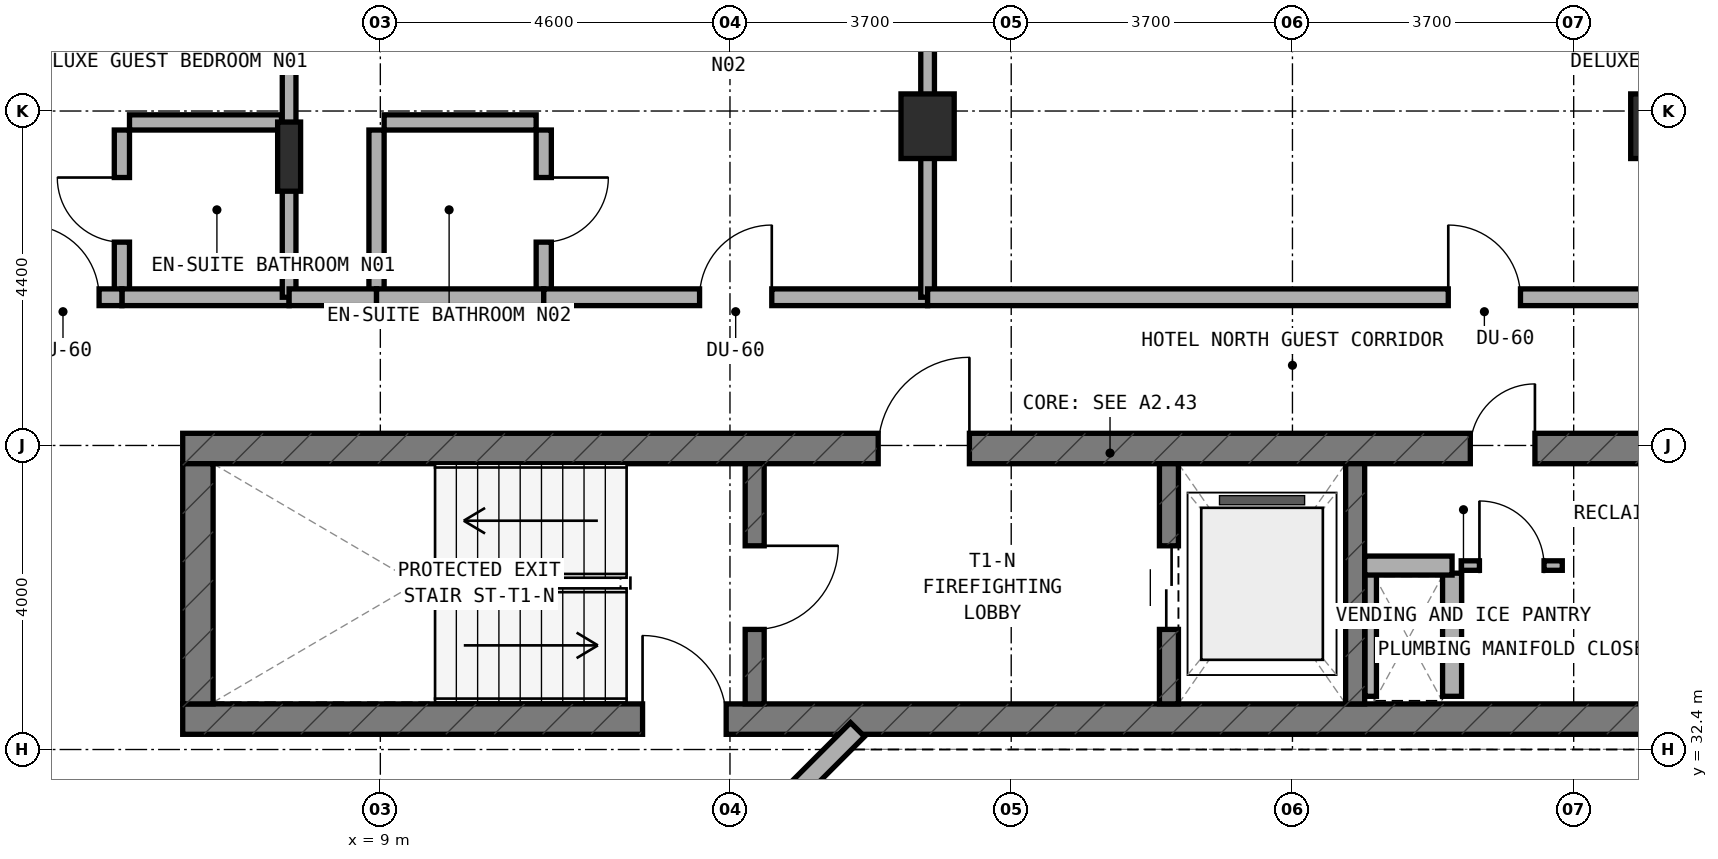
"""IFC4 building model, lengths in metres.
Left out: names, types, materials, properties, quantities, classifications, styles, units other than length and angle.
Written with IfcOpenShell. Run it as: python <this file> out.ifc"""

import sys

from ifc_helpers import new_model, si_unit, direction, frame, frame_2d, origin, origin_2d, place, context, subcontext, project, spatial, rectangle, i_section, extrude, element, fill, save


model = new_model("IFC4")
c1 = context("Model", 3, precision=1e-05, world=origin(), true_north=direction((0.0, 1.0)))
c2 = subcontext(c1, "Body", "Model", "MODEL_VIEW")
j1 = project(units=[si_unit("LENGTHUNIT", "METRE"), si_unit("PLANEANGLEUNIT", "RADIAN")], contexts=[c1])
p1 = place(None, origin())
s1 = spatial("IfcSite", under=j1, at=p1, CompositionType="ELEMENT")
p2 = place(p1, origin())
s2 = spatial("IfcBuilding", under=s1, at=p2, CompositionType="ELEMENT")
p3 = place(p2, frame((0.0, 0.0, 199.1)))
s3 = spatial("IfcBuildingStorey", under=s2, at=p3, CompositionType="ELEMENT", Elevation=199.1)
p4 = place(p3, frame((6.4, 32.8, 0.0), z_axis=(0.0, 0.0, 1.0), x_axis=(1.0, 0.0, 0.0)))
e1 = element("IfcWall", 1, at=p4, inside=s3, PredefinedType="SHEAR", context=c2, shape_type="SweptSolid", body=[
    extrude(rectangle(XDim=24.4, YDim=0.4, at=frame_2d((12.2, 0.0))), origin(), (0.0, 0.0, 1.0), 3.6),
])
p5 = place(p4, frame((6.05, 0.0, 0.0)))
e2 = element("IfcOpeningElement", 2, at=p5, cuts=e1, PredefinedType="OPENING", context=c2, shape_type="SweptSolid", body=[
    extrude(rectangle(XDim=1.1, YDim=2.15, at=frame_2d((0.55, 1.075))), frame((0.0, 0.21, 0.0), z_axis=(0.0, -1.0, 0.0), x_axis=(1.0, 0.0, 0.0)), (0.0, 0.0, 1.0), 0.42),
])
p6 = place(p3, frame((6.4, 36.36, 0.0), z_axis=(0.0, 0.0, 1.0), x_axis=(1.0, 0.0, 0.0)))
e3 = element("IfcWall", 3, at=p6, inside=s3, PredefinedType="SHEAR", context=c2, shape_type="SweptSolid", body=[
    extrude(rectangle(XDim=24.4, YDim=0.4, at=frame_2d((12.2, 0.0))), origin(), (0.0, 0.0, 1.0), 3.6),
])
p7 = place(p6, frame((9.15, 0.0, 0.0)))
e4 = element("IfcOpeningElement", 4, at=p7, cuts=e3, PredefinedType="OPENING", context=c2, shape_type="SweptSolid", body=[
    extrude(rectangle(XDim=1.2, YDim=2.15, at=frame_2d((0.6, 1.075))), frame((0.0, 0.21, 0.0), z_axis=(0.0, -1.0, 0.0), x_axis=(1.0, 0.0, 0.0)), (0.0, 0.0, 1.0), 0.42),
])
p8 = place(p6, frame((19.2, 0.0, 0.0)))
e5 = element("IfcOpeningElement", 5, at=p8, cuts=e3, PredefinedType="OPENING", context=c2, shape_type="SweptSolid", body=[
    extrude(rectangle(XDim=0.85, YDim=2.1, at=frame_2d((0.425, 1.05))), frame((0.0, 0.21, 0.0), z_axis=(0.0, -1.0, 0.0), x_axis=(1.0, 0.0, 0.0)), (0.0, 0.0, 1.0), 0.42),
])
p9 = place(p6, frame((16.94, 0.0, 0.0)))
e6 = element("IfcOpeningElement", 6, at=p9, cuts=e3, PredefinedType="OPENING", context=c2, shape_type="SweptSolid", body=[
    extrude(rectangle(XDim=0.85, YDim=2.1, at=frame_2d((0.425, 1.05))), frame((0.0, 0.21, 0.0), z_axis=(0.0, -1.0, 0.0), x_axis=(1.0, 0.0, 0.0)), (0.0, 0.0, 1.0), 0.42),
])
p10 = place(p3, frame((6.6, 33.0, 0.0), z_axis=(0.0, 0.0, 1.0), x_axis=(0.0, 1.0, 0.0)))
e7 = element("IfcWall", 7, at=p10, inside=s3, PredefinedType="SHEAR", context=c2, shape_type="SweptSolid", body=[
    extrude(rectangle(XDim=3.16, YDim=0.4, at=frame_2d((1.58, 0.0))), origin(), (0.0, 0.0, 1.0), 3.6),
])
p11 = place(p3, frame((13.925, 33.0, 0.0), z_axis=(0.0, 0.0, 1.0), x_axis=(0.0, 1.0, 0.0)))
e8 = element("IfcWall", 8, at=p11, inside=s3, PredefinedType="STANDARD", context=c2, shape_type="SweptSolid", body=[
    extrude(rectangle(XDim=3.16, YDim=0.25, at=frame_2d((1.58, 0.0))), origin(), (0.0, 0.0, 1.0), 3.32),
])
p12 = place(p11, frame((0.98, 0.0, 0.0)))
e9 = element("IfcOpeningElement", 9, at=p12, cuts=e8, PredefinedType="OPENING", context=c2, shape_type="SweptSolid", body=[
    extrude(rectangle(XDim=1.1, YDim=2.15, at=frame_2d((0.55, 1.075))), frame((0.0, 0.135, 0.0), z_axis=(0.0, -1.0, 0.0), x_axis=(1.0, 0.0, 0.0)), (0.0, 0.0, 1.0), 0.27),
])
p13 = place(p3, frame((19.375, 33.0, 0.0), z_axis=(0.0, 0.0, 1.0), x_axis=(0.0, 1.0, 0.0)))
e10 = element("IfcWall", 10, at=p13, inside=s3, PredefinedType="STANDARD", context=c2, shape_type="SweptSolid", body=[
    extrude(rectangle(XDim=3.16, YDim=0.25, at=frame_2d((1.58, 0.0))), origin(), (0.0, 0.0, 1.0), 3.32),
])
p14 = place(p13, frame((0.98, 0.0, 0.0)))
e11 = element("IfcOpeningElement", 11, at=p14, cuts=e10, PredefinedType="OPENING", context=c2, shape_type="SweptSolid", body=[
    extrude(rectangle(XDim=1.1, YDim=2.15, at=frame_2d((0.55, 1.075))), frame((0.0, 0.135, 0.0), z_axis=(0.0, -1.0, 0.0), x_axis=(1.0, 0.0, 0.0)), (0.0, 0.0, 1.0), 0.27),
])
p15 = place(p3, frame((21.825, 33.0, 0.0), z_axis=(0.0, 0.0, 1.0), x_axis=(0.0, 1.0, 0.0)))
e12 = element("IfcWall", 12, at=p15, inside=s3, PredefinedType="STANDARD", context=c2, shape_type="SweptSolid", body=[
    extrude(rectangle(XDim=3.16, YDim=0.25, at=frame_2d((1.58, 0.0))), origin(), (0.0, 0.0, 1.0), 3.32),
])
for number, where, z_axis, x_axis in (
    (13, (16.2, 40.6, 0.0), (0.0, 0.0, 1.0), (1.0, 0.0, 0.0)),
    (14, (25.8, 40.6, 0.0), (0.0, 0.0, 1.0), (1.0, 0.0, 0.0)),
):
    element("IfcColumn", number, at=place(p3, frame(where, z_axis=z_axis, x_axis=x_axis)), inside=s3, PredefinedType="COLUMN", context=c2, shape_type="SweptSolid", body=[
        extrude(rectangle(XDim=0.7, YDim=0.85, at=origin_2d()), origin(), (0.0, 0.0, 1.0), 3.6),
    ])
p16 = place(p3, frame((7.8, 40.2, 0.0), z_axis=(0.0, 0.0, 1.0), x_axis=(1.0, 0.0, 0.0)))
e15 = element("IfcColumn", 15, at=p16, inside=s3, PredefinedType="COLUMN", context=c2, shape_type="SweptSolid", body=[
    extrude(i_section(OverallWidth=0.302, OverallDepth=0.91, WebThickness=0.021, FlangeThickness=0.04, FilletRadius=0.03, at=origin_2d()), origin(), (0.0, 0.0, 1.0), 3.6),
])
p17 = place(p3, frame((5.199, 41.983, 0.0), z_axis=(0.0, 0.0, 1.0), x_axis=(-0.793999057278, -0.607918988881, 0.0)))
e16 = element("IfcWall", 16, at=p17, inside=s3, PredefinedType="STANDARD", context=c2, shape_type="SweptSolid", body=[
    extrude(rectangle(XDim=0.85, YDim=0.26, at=frame_2d((0.425, 0.0))), origin(), (0.0, 0.0, 1.0), 3.32),
])
p18 = place(p3, frame((15.278, 32.662, 0.0), z_axis=(0.0, 0.0, 1.0), x_axis=(-0.707059717605, -0.707153841636, 0.0)))
e17 = element("IfcWall", 17, at=p18, inside=s3, PredefinedType="STANDARD", context=c2, shape_type="SweptSolid", body=[
    extrude(rectangle(XDim=2.594, YDim=0.26, at=frame_2d((1.297, 0.0))), origin(), (0.0, 0.0, 1.0), 3.32),
])
p19 = place(p3, frame((22.03, 33.1, 0.0), z_axis=(0.0, 0.0, 1.0), x_axis=(0.0, 1.0, 0.0)))
e18 = element("IfcWall", 18, at=p19, inside=s3, PredefinedType="PARTITIONING", context=c2, shape_type="SweptSolid", body=[
    extrude(rectangle(XDim=1.62, YDim=0.15, at=frame_2d((0.81, 0.0))), origin(), (0.0, 0.0, 1.0), 3.32),
])
p20 = place(p3, frame((23.1, 33.1, 0.0), z_axis=(0.0, 0.0, 1.0), x_axis=(0.0, 1.0, 0.0)))
e19 = element("IfcWall", 19, at=p20, inside=s3, PredefinedType="SOLIDWALL", context=c2, shape_type="SweptSolid", body=[
    extrude(rectangle(XDim=1.62, YDim=0.25, at=frame_2d((0.81, 0.0))), origin(), (0.0, 0.0, 1.0), 3.32),
])
p21 = place(p3, frame((21.95, 34.82, 0.0), z_axis=(0.0, 0.0, 1.0), x_axis=(1.0, 0.0, 0.0)))
e20 = element("IfcWall", 20, at=p21, inside=s3, PredefinedType="SOLIDWALL", context=c2, shape_type="SweptSolid", body=[
    extrude(rectangle(XDim=1.15, YDim=0.25, at=frame_2d((0.575, 0.0))), origin(), (0.0, 0.0, 1.0), 3.32),
])
p22 = place(p3, frame((23.22, 34.82, 0.0), z_axis=(0.0, 0.0, 1.0), x_axis=(1.0, 0.0, 0.0)))
e21 = element("IfcWall", 21, at=p22, inside=s3, PredefinedType="PARTITIONING", context=c2, shape_type="SweptSolid", body=[
    extrude(rectangle(XDim=1.33, YDim=0.125, at=frame_2d((0.665, 0.0))), origin(), (0.0, 0.0, 1.0), 3.32),
])
p23 = place(p22, frame((0.24, 0.0, 0.0)))
e22 = element("IfcOpeningElement", 22, at=p23, cuts=e21, PredefinedType="OPENING", context=c2, shape_type="SweptSolid", body=[
    extrude(rectangle(XDim=0.85, YDim=2.1, at=frame_2d((0.425, 1.05))), frame((0.0, 0.073, 0.0), z_axis=(0.0, -1.0, 0.0), x_axis=(1.0, 0.0, 0.0)), (0.0, 0.0, 1.0), 0.145),
])
p24 = place(p3, frame((5.6, 38.45, 0.0), z_axis=(0.0, 0.0, 1.0), x_axis=(0.0, 1.0, 0.0)))
e23 = element("IfcWall", 23, at=p24, inside=s3, PredefinedType="PLUMBINGWALL", context=c2, shape_type="SweptSolid", body=[
    extrude(rectangle(XDim=2.1, YDim=0.2, at=frame_2d((1.05, 0.0))), origin(), (0.0, 0.0, 1.0), 3.32),
])
p25 = place(p24, frame((0.625, 0.0, 0.0)))
e24 = element("IfcOpeningElement", 24, at=p25, cuts=e23, PredefinedType="OPENING", context=c2, shape_type="SweptSolid", body=[
    extrude(rectangle(XDim=0.85, YDim=2.1, at=frame_2d((0.425, 1.05))), frame((0.0, 0.11, 0.0), z_axis=(0.0, -1.0, 0.0), x_axis=(1.0, 0.0, 0.0)), (0.0, 0.0, 1.0), 0.22),
])
p26 = place(p3, frame((5.7, 40.65, 0.0), z_axis=(0.0, 0.0, 1.0), x_axis=(1.0, 0.0, 0.0)))
e25 = element("IfcWall", 25, at=p26, inside=s3, PredefinedType="PLUMBINGWALL", context=c2, shape_type="SweptSolid", body=[
    extrude(rectangle(XDim=2.0, YDim=0.2, at=frame_2d((1.0, 0.0))), origin(), (0.0, 0.0, 1.0), 3.32),
])
p27 = place(p3, frame((5.6, 38.35, 0.0), z_axis=(0.0, 0.0, 1.0), x_axis=(1.0, 0.0, 0.0)))
e26 = element("IfcWall", 26, at=p27, inside=s3, PredefinedType="SOLIDWALL", context=c2, shape_type="SweptSolid", body=[
    extrude(rectangle(XDim=2.2, YDim=0.22, at=frame_2d((1.1, 0.0))), origin(), (0.0, 0.0, 1.0), 2.695),
])
p28 = place(p3, frame((1.96, 38.35, 0.0), z_axis=(0.0, 0.0, 1.0), x_axis=(1.0, 0.0, 0.0)))
e27 = element("IfcWall", 27, at=p28, inside=s3, PredefinedType="SOLIDWALL", context=c2, shape_type="SweptSolid", body=[
    extrude(rectangle(XDim=3.64, YDim=0.22, at=frame_2d((1.82, 0.0))), origin(), (0.0, 0.0, 1.0), 3.32),
])
p29 = place(p28, frame((2.39, 0.0, 0.0)))
e28 = element("IfcOpeningElement", 28, at=p29, cuts=e27, PredefinedType="OPENING", context=c2, shape_type="SweptSolid", body=[
    extrude(rectangle(XDim=0.95, YDim=2.1, at=frame_2d((0.475, 1.05))), frame((0.0, 0.12, 0.0), z_axis=(0.0, -1.0, 0.0), x_axis=(1.0, 0.0, 0.0)), (0.0, 0.0, 1.0), 0.24),
])
p30 = place(p3, frame((7.8, 38.35, 0.0), z_axis=(0.0, 0.0, 1.0), x_axis=(0.0, 1.0, 0.0)))
e29 = element("IfcWall", 29, at=p30, inside=s3, PredefinedType="SOLIDWALL", context=c2, shape_type="SweptSolid", body=[
    extrude(rectangle(XDim=4.308, YDim=0.18, at=frame_2d((2.154, 0.0))), origin(), (0.0, 0.0, 1.0), 2.695),
])
p31 = place(p3, frame((11.15, 38.45, 0.0), z_axis=(0.0, 0.0, 1.0), x_axis=(0.0, 1.0, 0.0)))
e30 = element("IfcWall", 30, at=p31, inside=s3, PredefinedType="PLUMBINGWALL", context=c2, shape_type="SweptSolid", body=[
    extrude(rectangle(XDim=2.1, YDim=0.2, at=frame_2d((1.05, 0.0))), origin(), (0.0, 0.0, 1.0), 3.015),
])
p32 = place(p31, frame((0.625, 0.0, 0.0)))
e31 = element("IfcOpeningElement", 31, at=p32, cuts=e30, PredefinedType="OPENING", context=c2, shape_type="SweptSolid", body=[
    extrude(rectangle(XDim=0.85, YDim=2.1, at=frame_2d((0.425, 1.05))), frame((0.0, 0.11, 0.0), z_axis=(0.0, -1.0, 0.0), x_axis=(1.0, 0.0, 0.0)), (0.0, 0.0, 1.0), 0.22),
])
p33 = place(p3, frame((9.05, 40.65, 0.0), z_axis=(0.0, 0.0, 1.0), x_axis=(1.0, 0.0, 0.0)))
e32 = element("IfcWall", 32, at=p33, inside=s3, PredefinedType="PLUMBINGWALL", context=c2, shape_type="SweptSolid", body=[
    extrude(rectangle(XDim=2.0, YDim=0.2, at=frame_2d((1.0, 0.0))), origin(), (0.0, 0.0, 1.0), 3.32),
])
p34 = place(p3, frame((8.95, 38.45, 0.0), z_axis=(0.0, 0.0, 1.0), x_axis=(0.0, 1.0, 0.0)))
e33 = element("IfcWall", 33, at=p34, inside=s3, PredefinedType="PLUMBINGWALL", context=c2, shape_type="SweptSolid", body=[
    extrude(rectangle(XDim=2.1, YDim=0.2, at=frame_2d((1.05, 0.0))), origin(), (0.0, 0.0, 1.0), 3.015),
])
p35 = place(p3, frame((7.8, 38.35, 0.0), z_axis=(0.0, 0.0, 1.0), x_axis=(1.0, 0.0, 0.0)))
e34 = element("IfcWall", 34, at=p35, inside=s3, PredefinedType="SOLIDWALL", context=c2, shape_type="SweptSolid", body=[
    extrude(rectangle(XDim=1.15, YDim=0.22, at=frame_2d((0.575, 0.0))), origin(), (0.0, 0.0, 1.0), 2.695),
])
p36 = place(p3, frame((8.95, 38.35, 0.0), z_axis=(0.0, 0.0, 1.0), x_axis=(1.0, 0.0, 0.0)))
e35 = element("IfcWall", 35, at=p36, inside=s3, PredefinedType="SOLIDWALL", context=c2, shape_type="SweptSolid", body=[
    extrude(rectangle(XDim=2.2, YDim=0.22, at=frame_2d((1.1, 0.0))), origin(), (0.0, 0.0, 1.0), 3.32),
])
p37 = place(p3, frame((11.15, 38.35, 0.0), z_axis=(0.0, 0.0, 1.0), x_axis=(1.0, 0.0, 0.0)))
e36 = element("IfcWall", 36, at=p37, inside=s3, PredefinedType="SOLIDWALL", context=c2, shape_type="SweptSolid", body=[
    extrude(rectangle(XDim=5.05, YDim=0.22, at=frame_2d((2.525, 0.0))), origin(), (0.0, 0.0, 1.0), 2.695),
])
p38 = place(p37, frame((2.05, 0.0, 0.0)))
e37 = element("IfcOpeningElement", 37, at=p38, cuts=e36, PredefinedType="OPENING", context=c2, shape_type="SweptSolid", body=[
    extrude(rectangle(XDim=0.95, YDim=2.1, at=frame_2d((0.475, 1.05))), frame((0.0, 0.12, 0.0), z_axis=(0.0, -1.0, 0.0), x_axis=(1.0, 0.0, 0.0)), (0.0, 0.0, 1.0), 0.24),
])
p39 = place(p3, frame((16.2, 38.35, 0.0), z_axis=(0.0, 0.0, 1.0), x_axis=(0.0, 1.0, 0.0)))
e38 = element("IfcWall", 38, at=p39, inside=s3, PredefinedType="SOLIDWALL", context=c2, shape_type="SweptSolid", body=[
    extrude(rectangle(XDim=5.79, YDim=0.18, at=frame_2d((2.895, 0.0))), origin(), (0.0, 0.0, 1.0), 2.695),
])
p40 = place(p3, frame((16.2, 38.35, 0.0), z_axis=(0.0, 0.0, 1.0), x_axis=(1.0, 0.0, 0.0)))
e39 = element("IfcWall", 39, at=p40, inside=s3, PredefinedType="SOLIDWALL", context=c2, shape_type="SweptSolid", body=[
    extrude(rectangle(XDim=14.65, YDim=0.22, at=frame_2d((7.325, 0.0))), origin(), (0.0, 0.0, 1.0), 2.695),
])
p41 = place(p40, frame((6.85, 0.0, 0.0)))
e40 = element("IfcOpeningElement", 40, at=p41, cuts=e39, PredefinedType="OPENING", context=c2, shape_type="SweptSolid", body=[
    extrude(rectangle(XDim=0.95, YDim=2.1, at=frame_2d((0.475, 1.05))), frame((0.0, 0.12, 0.0), z_axis=(0.0, -1.0, 0.0), x_axis=(1.0, 0.0, 0.0)), (0.0, 0.0, 1.0), 0.24),
])
p42 = place(p12, frame((1.1, 0.0, 0.0), z_axis=(0.0, 0.0, 1.0), x_axis=(-1.0, 0.0, 0.0)))
e41 = element("IfcDoor", 41, at=p42, inside=s3, OperationType="SINGLE_SWING_LEFT", PredefinedType="DOOR", context=c2, shape_type="SweptSolid", body=[
    extrude(rectangle(XDim=1.1, YDim=2.15, at=frame_2d((0.55, 1.075))), frame((0.0, 0.025, 0.0), z_axis=(0.0, -1.0, 0.0), x_axis=(1.0, 0.0, 0.0)), (0.0, 0.0, 1.0), 0.05),
])
fill(e9, e41)
p43 = place(p7, origin())
e42 = element("IfcDoor", 42, at=p43, inside=s3, OperationType="SINGLE_SWING_RIGHT", PredefinedType="DOOR", context=c2, shape_type="SweptSolid", body=[
    extrude(rectangle(XDim=1.2, YDim=2.15, at=frame_2d((0.6, 1.075))), frame((0.0, 0.025, 0.0), z_axis=(0.0, -1.0, 0.0), x_axis=(1.0, 0.0, 0.0)), (0.0, 0.0, 1.0), 0.05),
])
fill(e4, e42)
p44 = place(p14, origin())
e43 = element("IfcDoor", 43, at=p44, inside=s3, OperationType="DOUBLE_DOOR_SLIDING", PredefinedType="DOOR", context=c2, shape_type="SweptSolid", body=[
    extrude(rectangle(XDim=1.1, YDim=2.15, at=frame_2d((0.55, 1.075))), frame((0.0, 0.025, 0.0), z_axis=(0.0, -1.0, 0.0), x_axis=(1.0, 0.0, 0.0)), (0.0, 0.0, 1.0), 0.05),
])
fill(e11, e43)
p45 = place(p9, origin())
e44 = element("IfcDoor", 44, at=p45, inside=s3, OperationType="SINGLE_SWING_RIGHT", PredefinedType="DOOR", context=c2, shape_type="SweptSolid", body=[
    extrude(rectangle(XDim=0.85, YDim=2.1, at=frame_2d((0.425, 1.05))), frame((0.0, 0.025, 0.0), z_axis=(0.0, -1.0, 0.0), x_axis=(1.0, 0.0, 0.0)), (0.0, 0.0, 1.0), 0.05),
])
fill(e6, e44)
p46 = place(p5, origin())
e45 = element("IfcDoor", 45, at=p46, inside=s3, OperationType="SINGLE_SWING_LEFT", PredefinedType="DOOR", context=c2, shape_type="SweptSolid", body=[
    extrude(rectangle(XDim=1.1, YDim=2.15, at=frame_2d((0.55, 1.075))), frame((0.0, 0.025, 0.0), z_axis=(0.0, -1.0, 0.0), x_axis=(1.0, 0.0, 0.0)), (0.0, 0.0, 1.0), 0.05),
])
fill(e2, e45)
p47 = place(p23, origin())
e46 = element("IfcDoor", 46, at=p47, inside=s3, OperationType="SINGLE_SWING_LEFT", PredefinedType="DOOR", context=c2, shape_type="SweptSolid", body=[
    extrude(rectangle(XDim=0.85, YDim=2.1, at=frame_2d((0.425, 1.05))), frame((0.0, 0.025, 0.0), z_axis=(0.0, -1.0, 0.0), x_axis=(1.0, 0.0, 0.0)), (0.0, 0.0, 1.0), 0.05),
])
fill(e22, e46)
p48 = place(p25, origin())
e47 = element("IfcDoor", 47, at=p48, inside=s3, OperationType="SINGLE_SWING_RIGHT", PredefinedType="DOOR", context=c2, shape_type="SweptSolid", body=[
    extrude(rectangle(XDim=0.85, YDim=2.1, at=frame_2d((0.425, 1.05))), frame((0.0, 0.025, 0.0), z_axis=(0.0, -1.0, 0.0), x_axis=(1.0, 0.0, 0.0)), (0.0, 0.0, 1.0), 0.05),
])
fill(e24, e47)
p49 = place(p29, origin())
e48 = element("IfcDoor", 48, at=p49, inside=s3, OperationType="SINGLE_SWING_LEFT", PredefinedType="DOOR", context=c2, shape_type="SweptSolid", body=[
    extrude(rectangle(XDim=0.95, YDim=2.1, at=frame_2d((0.475, 1.05))), frame((0.0, 0.025, 0.0), z_axis=(0.0, -1.0, 0.0), x_axis=(1.0, 0.0, 0.0)), (0.0, 0.0, 1.0), 0.05),
])
fill(e28, e48)
p50 = place(p32, frame((0.85, 0.0, 0.0), z_axis=(0.0, 0.0, 1.0), x_axis=(-1.0, 0.0, 0.0)))
e49 = element("IfcDoor", 49, at=p50, inside=s3, OperationType="SINGLE_SWING_LEFT", PredefinedType="DOOR", context=c2, shape_type="SweptSolid", body=[
    extrude(rectangle(XDim=0.85, YDim=2.1, at=frame_2d((0.425, 1.05))), frame((0.0, 0.025, 0.0), z_axis=(0.0, -1.0, 0.0), x_axis=(1.0, 0.0, 0.0)), (0.0, 0.0, 1.0), 0.05),
])
fill(e31, e49)
p51 = place(p38, origin())
e50 = element("IfcDoor", 50, at=p51, inside=s3, OperationType="SINGLE_SWING_RIGHT", PredefinedType="DOOR", context=c2, shape_type="SweptSolid", body=[
    extrude(rectangle(XDim=0.95, YDim=2.1, at=frame_2d((0.475, 1.05))), frame((0.0, 0.025, 0.0), z_axis=(0.0, -1.0, 0.0), x_axis=(1.0, 0.0, 0.0)), (0.0, 0.0, 1.0), 0.05),
])
fill(e37, e50)
p52 = place(p41, origin())
e51 = element("IfcDoor", 51, at=p52, inside=s3, OperationType="SINGLE_SWING_LEFT", PredefinedType="DOOR", context=c2, shape_type="SweptSolid", body=[
    extrude(rectangle(XDim=0.95, YDim=2.1, at=frame_2d((0.475, 1.05))), frame((0.0, 0.025, 0.0), z_axis=(0.0, -1.0, 0.0), x_axis=(1.0, 0.0, 0.0)), (0.0, 0.0, 1.0), 0.05),
])
fill(e40, e51)
save(model, sys.argv[1])
